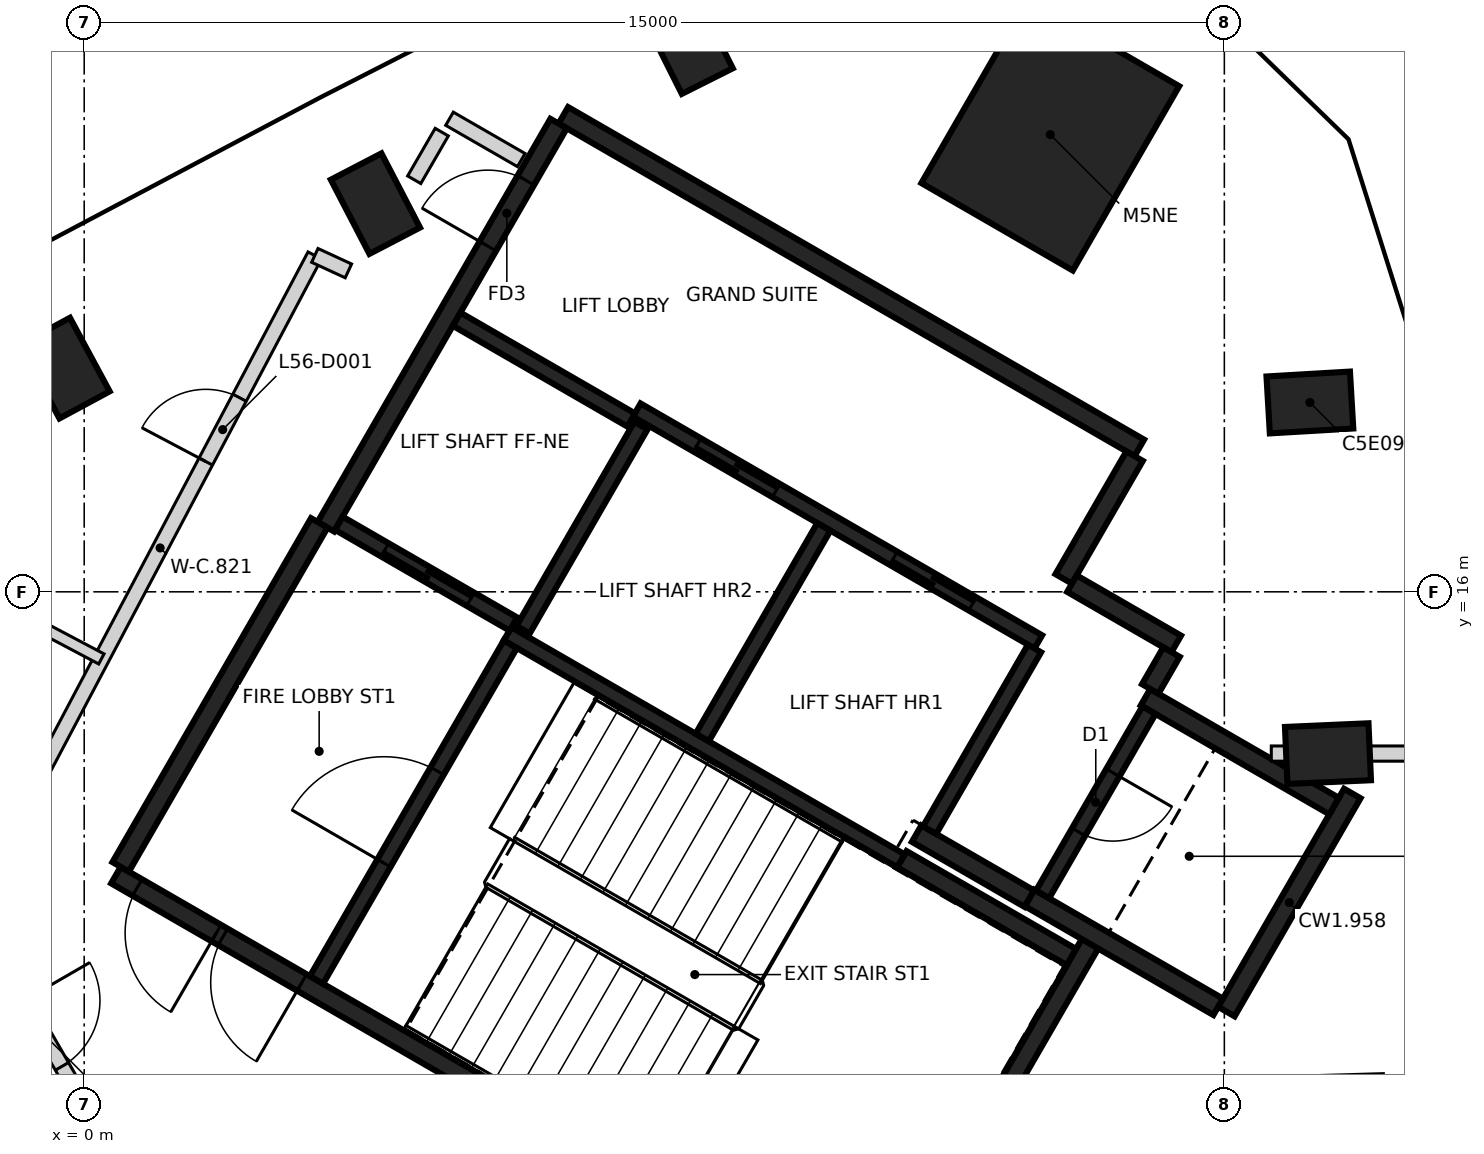
"""IFC4 building model, lengths in metres.
Left out: names, types, materials, properties, quantities, classifications, styles, units other than length and angle.
Written with IfcOpenShell. Run it as: python <this file> out.ifc"""

import sys

from ifc_helpers import new_model, si_unit, direction, frame, frame_2d, origin, origin_2d, place, context, subcontext, project, spatial, rectangle, extrude, element, fill, save


model = new_model("IFC4")
c1 = context("Model", 3, precision=1e-05, world=origin(), true_north=direction((0.0, 1.0)))
c2 = subcontext(c1, "Body", "Model", "MODEL_VIEW")
j1 = project(units=[si_unit("LENGTHUNIT", "METRE"), si_unit("PLANEANGLEUNIT", "RADIAN")], contexts=[c1])
p1 = place(None, origin())
s1 = spatial("IfcSite", under=j1, at=p1, CompositionType="ELEMENT")
p2 = place(p1, origin())
s2 = spatial("IfcBuilding", under=s1, at=p2, CompositionType="ELEMENT")
p3 = place(p2, frame((0.0, 0.0, 225.0)))
s3 = spatial("IfcBuildingStorey", under=s2, at=p3, CompositionType="ELEMENT", Elevation=225.0)
for number, where, z_axis, x_axis in (
    (1, (16.363, 13.872, -0.35), (0.0, 0.0, 1.0), (0.999, 0.044, 0.0)),
    (2, (16.125, 18.491, -0.35), (0.0, 0.0, 1.0), (0.998, 0.058, 0.0)),
    (3, (7.951, 23.211, -0.35), (0.0, 0.0, 1.0), (-0.449, 0.894, 0.0)),
    (4, (3.832, 21.107, -0.35), (0.0, 0.0, 1.0), (-0.461, 0.887, 0.0)),
    (5, (-0.256, 18.943, -0.35), (0.0, 0.0, 1.0), (-0.475, 0.88, 0.0)),
):
    element("IfcColumn", number, at=place(p3, frame(where, z_axis=z_axis, x_axis=x_axis)), inside=s3, PredefinedType="COLUMN", context=c2, shape_type="SweptSolid", body=[
        extrude(rectangle(XDim=1.1, YDim=0.75, at=origin_2d()), origin(), (0.0, 0.0, 1.0), 3.6),
    ])
p4 = place(p3, frame((12.71, 22.015, -0.35), z_axis=(0.0, 0.0, 1.0), x_axis=(0.5, 0.866025403784, 0.0)))
e6 = element("IfcColumn", 6, at=p4, inside=s3, PredefinedType="COLUMN", context=c2, shape_type="SweptSolid", body=[
    extrude(rectangle(XDim=2.8, YDim=2.3, at=origin_2d()), origin(), (0.0, 0.0, 1.0), 3.6),
])
p5 = place(p3, frame((10.42, 6.498, 0.0), z_axis=(0.0, 0.0, 1.0), x_axis=(-0.866021906294, 0.500006057782, 0.0)))
e7 = element("IfcWall", 7, at=p5, inside=s3, PredefinedType="SHEAR", context=c2, shape_type="SweptSolid", body=[
    extrude(rectangle(XDim=11.55, YDim=0.25, at=frame_2d((5.775, 0.0))), origin(), (0.0, 0.0, 1.0), 3.25),
])
p6 = place(p5, frame((10.025, 0.0, 0.0)))
e8 = element("IfcOpeningElement", 8, at=p6, cuts=e7, PredefinedType="OPENING", context=c2, shape_type="SweptSolid", body=[
    extrude(rectangle(XDim=1.2, YDim=2.1, at=frame_2d((0.6, 1.05))), frame((0.0, 0.135, 0.0), z_axis=(0.0, -1.0, 0.0), x_axis=(1.0, 0.0, 0.0)), (0.0, 0.0, 1.0), 0.27),
])
p7 = place(p5, frame((8.725, 0.0, 0.0)))
e9 = element("IfcOpeningElement", 9, at=p7, cuts=e7, PredefinedType="OPENING", context=c2, shape_type="SweptSolid", body=[
    extrude(rectangle(XDim=1.2, YDim=2.1, at=frame_2d((0.6, 1.05))), frame((0.0, 0.135, 0.0), z_axis=(0.0, -1.0, 0.0), x_axis=(1.0, 0.0, 0.0)), (0.0, 0.0, 1.0), 0.27),
])
p8 = place(p3, frame((6.304, 22.269, 0.0), z_axis=(0.0, 0.0, 1.0), x_axis=(0.866022959057, -0.500004234368, 0.0)))
e10 = element("IfcWall", 10, at=p8, inside=s3, PredefinedType="SHEAR", context=c2, shape_type="SweptSolid", body=[
    extrude(rectangle(XDim=8.75, YDim=0.25, at=frame_2d((4.375, 0.0))), origin(), (0.0, 0.0, 1.0), 3.25),
])
p9 = place(p3, frame((3.179, 16.856, 0.0), z_axis=(0.0, 0.0, 1.0), x_axis=(0.500001955336, 0.866024274868, 0.0)))
e11 = element("IfcWall", 11, at=p9, inside=s3, PredefinedType="SHEAR", context=c2, shape_type="SweptSolid", body=[
    extrude(rectangle(XDim=6.125, YDim=0.25, at=frame_2d((3.062, 0.0))), origin(), (0.0, 0.0, 1.0), 3.25),
])
p10 = place(p9, frame((4.263, 0.0, 0.0)))
e12 = element("IfcOpeningElement", 12, at=p10, cuts=e11, PredefinedType="OPENING", context=c2, shape_type="SweptSolid", body=[
    extrude(rectangle(XDim=1.0, YDim=2.1, at=frame_2d((0.5, 1.05))), frame((0.0, 0.135, 0.0), z_axis=(0.0, -1.0, 0.0), x_axis=(1.0, 0.0, 0.0)), (0.0, 0.0, 1.0), 0.27),
])
p11 = place(p3, frame((0.48, 12.381, 0.0), z_axis=(0.0, 0.0, 1.0), x_axis=(0.49999885962, 0.866026062182, 0.0)))
e13 = element("IfcWall", 13, at=p11, inside=s3, PredefinedType="SHEAR", context=c2, shape_type="SweptSolid", body=[
    extrude(rectangle(XDim=5.225, YDim=0.25, at=frame_2d((2.612, 0.0))), origin(), (0.0, 0.0, 1.0), 3.25),
])
p12 = place(p3, frame((13.238, 11.378, 0.0), z_axis=(0.0, 0.0, 1.0), x_axis=(-0.500008851346, -0.866020293397, 0.0)))
e14 = element("IfcWall", 14, at=p12, inside=s3, PredefinedType="SHEAR", context=c2, shape_type="SweptSolid", body=[
    extrude(rectangle(XDim=5.51, YDim=0.25, at=frame_2d((2.755, 0.0))), origin(), (0.0, 0.0, 1.0), 3.25),
])
p13 = place(p3, frame((16.684, 13.347, 0.0), z_axis=(0.0, 0.0, 1.0), x_axis=(-0.499998874531, -0.866026053573, 0.0)))
e15 = element("IfcWall", 15, at=p13, inside=s3, PredefinedType="SHEAR", context=c2, shape_type="SweptSolid", body=[
    extrude(rectangle(XDim=3.313, YDim=0.25, at=frame_2d((1.656, 0.0))), origin(), (0.0, 0.0, 1.0), 3.25),
])
p14 = place(p3, frame((14.918, 10.54, 0.0), z_axis=(0.0, 0.0, 1.0), x_axis=(-0.866063538972, 0.499933942099, 0.0)))
e16 = element("IfcWall", 16, at=p14, inside=s3, PredefinedType="SHEAR", context=c2, shape_type="SweptSolid", body=[
    extrude(rectangle(XDim=2.865, YDim=0.25, at=frame_2d((1.432, 0.0))), origin(), (0.0, 0.0, 1.0), 3.25),
])
p15 = place(p3, frame((13.963, 14.614, 0.0), z_axis=(0.0, 0.0, 1.0), x_axis=(0.866042235819, -0.499970844928, 0.0)))
e17 = element("IfcWall", 17, at=p15, inside=s3, PredefinedType="SHEAR", context=c2, shape_type="SweptSolid", body=[
    extrude(rectangle(XDim=2.865, YDim=0.25, at=frame_2d((1.432, 0.0))), origin(), (0.0, 0.0, 1.0), 3.25),
])
p16 = place(p3, frame((10.757, 12.481, 0.0), z_axis=(0.0, 0.0, 1.0), x_axis=(0.866022940537, -0.500004266446, 0.0)))
e18 = element("IfcWall", 18, at=p16, inside=s3, PredefinedType="SHEAR", context=c2, shape_type="SweptSolid", body=[
    extrude(rectangle(XDim=2.575, YDim=0.25, at=frame_2d((1.287, 0.0))), origin(), (0.0, 0.0, 1.0), 3.25),
])
p17 = place(p3, frame((13.819, 17.785, 0.0), z_axis=(0.0, 0.0, 1.0), x_axis=(-0.500039802285, -0.866002422705, 0.0)))
e19 = element("IfcWall", 19, at=p17, inside=s3, PredefinedType="SHEAR", context=c2, shape_type="SweptSolid", body=[
    extrude(rectangle(XDim=1.865, YDim=0.25, at=frame_2d((0.932, 0.0))), origin(), (0.0, 0.0, 1.0), 3.25),
])
p18 = place(p3, frame((12.433, 11.964, 0.0), z_axis=(0.0, 0.0, 1.0), x_axis=(-0.866038183914, 0.499977863513, 0.0)))
e20 = element("IfcWall", 20, at=p18, inside=s3, PredefinedType="SHEAR", context=c2, shape_type="SweptSolid", body=[
    extrude(rectangle(XDim=1.71, YDim=0.25, at=frame_2d((0.855, 0.0))), origin(), (0.0, 0.0, 1.0), 3.25),
])
p19 = place(p3, frame((12.995, 16.108, 0.0), z_axis=(0.0, 0.0, 1.0), x_axis=(0.866044474677, -0.49996696679, 0.0)))
e21 = element("IfcWall", 21, at=p19, inside=s3, PredefinedType="SHEAR", context=c2, shape_type="SweptSolid", body=[
    extrude(rectangle(XDim=1.584, YDim=0.25, at=frame_2d((0.792, 0.0))), origin(), (0.0, 0.0, 1.0), 3.25),
])
p20 = place(p3, frame((14.305, 15.207, 0.0), z_axis=(0.0, 0.0, 1.0), x_axis=(-0.499848422343, -0.866112899501, 0.0)))
e22 = element("IfcWall", 22, at=p20, inside=s3, PredefinedType="SHEAR", context=c2, shape_type="SweptSolid", body=[
    extrude(rectangle(XDim=0.559, YDim=0.25, at=frame_2d((0.28, 0.0))), origin(), (0.0, 0.0, 1.0), 3.25),
])
p21 = place(p3, frame((12.552, 15.342, 0.0), z_axis=(0.0, 0.0, 1.0), x_axis=(-0.866030299012, 0.499991521122, 0.0)))
e23 = element("IfcWall", 23, at=p21, inside=s3, PredefinedType="SHEAR", context=c2, shape_type="SweptSolid", body=[
    extrude(rectangle(XDim=6.1, YDim=0.2, at=frame_2d((3.05, 0.0))), origin(), (0.0, 0.0, 1.0), 3.25),
])
p22 = place(p21, frame((1.0, 0.0, 0.0)))
e24 = element("IfcOpeningElement", 24, at=p22, cuts=e23, PredefinedType="OPENING", context=c2, shape_type="SweptSolid", body=[
    extrude(rectangle(XDim=1.2, YDim=2.1, at=frame_2d((0.6, 1.05))), frame((0.0, 0.11, 0.0), z_axis=(0.0, -1.0, 0.0), x_axis=(1.0, 0.0, 0.0)), (0.0, 0.0, 1.0), 0.22),
])
p23 = place(p21, frame((3.982, 0.0, 0.0)))
e25 = element("IfcOpeningElement", 25, at=p23, cuts=e23, PredefinedType="OPENING", context=c2, shape_type="SweptSolid", body=[
    extrude(rectangle(XDim=1.2, YDim=2.1, at=frame_2d((0.6, 1.05))), frame((0.0, 0.11, 0.0), z_axis=(0.0, -1.0, 0.0), x_axis=(1.0, 0.0, 0.0)), (0.0, 0.0, 1.0), 0.22),
])
p24 = place(p3, frame((10.743, 12.46, 0.0), z_axis=(0.0, 0.0, 1.0), x_axis=(-0.866018848283, 0.500011354289, 0.0)))
e26 = element("IfcWall", 26, at=p24, inside=s3, PredefinedType="SHEAR", context=c2, shape_type="SweptSolid", body=[
    extrude(rectangle(XDim=5.974, YDim=0.2, at=frame_2d((2.987, 0.0))), origin(), (0.0, 0.0, 1.0), 3.25),
])
p25 = place(p3, frame((3.057, 10.895, 0.0), z_axis=(0.0, 0.0, 1.0), x_axis=(0.500027839223, 0.866009330205, 0.0)))
e27 = element("IfcWall", 27, at=p25, inside=s3, PredefinedType="SHEAR", context=c2, shape_type="SweptSolid", body=[
    extrude(rectangle(XDim=5.098, YDim=0.2, at=frame_2d((2.549, 0.0))), origin(), (0.0, 0.0, 1.0), 3.25),
])
p26 = place(p25, frame((1.774, 0.0, 0.0)))
e28 = element("IfcOpeningElement", 28, at=p26, cuts=e27, PredefinedType="OPENING", context=c2, shape_type="SweptSolid", body=[
    extrude(rectangle(XDim=1.4, YDim=2.1, at=frame_2d((0.7, 1.05))), frame((0.0, 0.11, 0.0), z_axis=(0.0, -1.0, 0.0), x_axis=(1.0, 0.0, 0.0)), (0.0, 0.0, 1.0), 0.22),
])
p27 = place(p3, frame((8.132, 14.084, 0.0), z_axis=(0.0, 0.0, 1.0), x_axis=(0.500030834389, 0.86600760081, 0.0)))
e29 = element("IfcWall", 29, at=p27, inside=s3, PredefinedType="SHEAR", context=c2, shape_type="SweptSolid", body=[
    extrude(rectangle(XDim=3.198, YDim=0.2, at=frame_2d((1.599, 0.0))), origin(), (0.0, 0.0, 1.0), 3.25),
])
p28 = place(p3, frame((14.008, 14.442, 0.0), z_axis=(0.0, 0.0, 1.0), x_axis=(-0.499986818241, -0.866033014143, 0.0)))
e30 = element("IfcWall", 30, at=p28, inside=s3, PredefinedType="SHEAR", context=c2, shape_type="SweptSolid", body=[
    extrude(rectangle(XDim=2.798, YDim=0.2, at=frame_2d((1.399, 0.0))), origin(), (0.0, 0.0, 1.0), 3.25),
])
p29 = place(p28, frame((0.949, 0.0, 0.0)))
e31 = element("IfcOpeningElement", 31, at=p29, cuts=e30, PredefinedType="OPENING", context=c2, shape_type="SweptSolid", body=[
    extrude(rectangle(XDim=0.9, YDim=2.1, at=frame_2d((0.45, 1.05))), frame((0.0, 0.11, 0.0), z_axis=(0.0, -1.0, 0.0), x_axis=(1.0, 0.0, 0.0)), (0.0, 0.0, 1.0), 0.22),
])
p30 = place(p3, frame((12.502, 15.255, 0.0), z_axis=(0.0, 0.0, 1.0), x_axis=(-0.499965018551, -0.866045599391, 0.0)))
e32 = element("IfcWall", 32, at=p30, inside=s3, PredefinedType="SHEAR", context=c2, shape_type="SweptSolid", body=[
    extrude(rectangle(XDim=2.759, YDim=0.2, at=frame_2d((1.379, 0.0))), origin(), (0.0, 0.0, 1.0), 3.25),
])
p31 = place(p3, frame((7.324, 18.187, 0.0), z_axis=(0.0, 0.0, 1.0), x_axis=(-0.499967891604, -0.866043940782, 0.0)))
e33 = element("IfcWall", 33, at=p31, inside=s3, PredefinedType="SHEAR", context=c2, shape_type="SweptSolid", body=[
    extrude(rectangle(XDim=3.1, YDim=0.2, at=frame_2d((1.55, 0.0))), origin(), (0.0, 0.0, 1.0), 3.25),
])
p32 = place(p3, frame((5.646, 15.576, 0.0), z_axis=(0.0, 0.0, 1.0), x_axis=(-0.866018407898, 0.500012117035, 0.0)))
e34 = element("IfcWall", 34, at=p32, inside=s3, PredefinedType="SHEAR", context=c2, shape_type="SweptSolid", body=[
    extrude(rectangle(XDim=2.651, YDim=0.2, at=frame_2d((1.325, 0.0))), origin(), (0.0, 0.0, 1.0), 3.25),
])
p33 = place(p32, frame((0.652, 0.0, 0.0)))
e35 = element("IfcOpeningElement", 35, at=p33, cuts=e34, PredefinedType="OPENING", context=c2, shape_type="SweptSolid", body=[
    extrude(rectangle(XDim=1.3, YDim=2.1, at=frame_2d((0.65, 1.05))), frame((0.0, 0.11, 0.0), z_axis=(0.0, -1.0, 0.0), x_axis=(1.0, 0.0, 0.0)), (0.0, 0.0, 1.0), 0.22),
])
p34 = place(p3, frame((7.196, 18.26, 0.0), z_axis=(0.0, 0.0, 1.0), x_axis=(-0.866018407898, 0.500012117035, 0.0)))
e36 = element("IfcWall", 36, at=p34, inside=s3, PredefinedType="SHEAR", context=c2, shape_type="SweptSolid", body=[
    extrude(rectangle(XDim=2.651, YDim=0.2, at=frame_2d((1.325, 0.0))), origin(), (0.0, 0.0, 1.0), 3.25),
])
p35 = place(p3, frame((-2.43, 13.459, 0.0), z_axis=(0.0, 0.0, 1.0), x_axis=(0.499957265187, -0.866050075334, 0.0)))
e37 = element("IfcWall", 37, at=p35, inside=s3, PredefinedType="PARTITIONING", context=c2, shape_type="SweptSolid", body=[
    extrude(rectangle(XDim=6.87, YDim=0.2, at=frame_2d((3.435, 0.0))), origin(), (0.0, 0.0, 1.0), 3.25),
])
p36 = place(p35, frame((3.275, 0.0, 0.0)))
e38 = element("IfcOpeningElement", 38, at=p36, cuts=e37, PredefinedType="OPENING", context=c2, shape_type="SweptSolid", body=[
    extrude(rectangle(XDim=1.0, YDim=2.1, at=frame_2d((0.5, 1.05))), frame((0.0, 0.11, 0.0), z_axis=(0.0, -1.0, 0.0), x_axis=(1.0, 0.0, 0.0)), (0.0, 0.0, 1.0), 0.22),
])
p37 = place(p3, frame((-1.035, 12.73, 0.0), z_axis=(0.0, 0.0, 1.0), x_axis=(0.46738248691, 0.884055208078, 0.0)))
e39 = element("IfcWall", 39, at=p37, inside=s3, PredefinedType="PARTITIONING", context=c2, shape_type="SweptSolid", body=[
    extrude(rectangle(XDim=8.705, YDim=0.2, at=frame_2d((4.352, 0.0))), origin(), (0.0, 0.0, 1.0), 3.25),
])
p38 = place(p37, frame((5.638, 0.0, 0.0)))
e40 = element("IfcOpeningElement", 40, at=p38, cuts=e39, PredefinedType="OPENING", context=c2, shape_type="SweptSolid", body=[
    extrude(rectangle(XDim=0.95, YDim=2.1, at=frame_2d((0.475, 1.05))), frame((0.0, 0.11, 0.0), z_axis=(0.0, -1.0, 0.0), x_axis=(1.0, 0.0, 0.0)), (0.0, 0.0, 1.0), 0.22),
])
p39 = place(p3, frame((3.034, 20.426, 0.0), z_axis=(0.0, 0.0, 1.0), x_axis=(0.907930035436, -0.41912176125, 0.0)))
e41 = element("IfcWall", 41, at=p39, inside=s3, PredefinedType="PARTITIONING", context=c2, shape_type="SweptSolid", body=[
    extrude(rectangle(XDim=0.487, YDim=0.2, at=frame_2d((0.244, 0.0))), origin(), (0.0, 0.0, 1.0), 3.25),
])
p40 = place(p3, frame((4.342, 21.421, 0.0), z_axis=(0.0, 0.0, 1.0), x_axis=(0.500238258503, 0.865887801468, 0.0)))
e42 = element("IfcWall", 42, at=p40, inside=s3, PredefinedType="PARTITIONING", context=c2, shape_type="SweptSolid", body=[
    extrude(rectangle(XDim=0.724, YDim=0.2, at=frame_2d((0.362, 0.0))), origin(), (0.0, 0.0, 1.0), 2.35),
])
p41 = place(p3, frame((4.806, 22.224, 0.0), z_axis=(0.0, 0.0, 1.0), x_axis=(0.866334698307, -0.499463903109, 0.0)))
e43 = element("IfcWall", 43, at=p41, inside=s3, PredefinedType="PARTITIONING", context=c2, shape_type="SweptSolid", body=[
    extrude(rectangle(XDim=1.09, YDim=0.2, at=frame_2d((0.545, 0.0))), origin(), (0.0, 0.0, 1.0), 2.35),
])
p42 = place(p3, frame((15.618, 13.872, 0.0), z_axis=(0.0, 0.0, 1.0), x_axis=(1.0, 0.0, 0.0)))
e44 = element("IfcWall", 44, at=p42, inside=s3, PredefinedType="PARTITIONING", context=c2, shape_type="SweptSolid", body=[
    extrude(rectangle(XDim=2.316, YDim=0.2, at=frame_2d((1.158, 0.0))), origin(), (0.0, 0.0, 1.0), 3.25),
])
p43 = place(p3, frame((-2.426, 16.519, 0.0), z_axis=(0.0, 0.0, 1.0), x_axis=(0.884056991815, -0.467379112952, 0.0)))
e45 = element("IfcWall", 45, at=p43, inside=s3, PredefinedType="PARTITIONING", context=c2, shape_type="SweptSolid", body=[
    extrude(rectangle(XDim=3.0, YDim=0.15, at=frame_2d((1.5, 0.0))), origin(), (0.0, 0.0, 1.0), 3.25),
])
p44 = place(p43, frame((1.1, 0.0, 0.0)))
e46 = element("IfcOpeningElement", 46, at=p44, cuts=e45, PredefinedType="OPENING", context=c2, shape_type="SweptSolid", body=[
    extrude(rectangle(XDim=0.8, YDim=2.1, at=frame_2d((0.4, 1.05))), frame((0.0, 0.085, 0.0), z_axis=(0.0, -1.0, 0.0), x_axis=(1.0, 0.0, 0.0)), (0.0, 0.0, 1.0), 0.17),
])
p45 = place(p3, frame((-2.131, 9.74, 0.0), z_axis=(0.0, 0.0, 1.0), x_axis=(0.500010275428, -0.866019471182, 0.0)))
e47 = element("IfcWall", 47, at=p45, inside=s3, PredefinedType="PARTITIONING", context=c2, shape_type="SweptSolid", body=[
    extrude(rectangle(XDim=3.5, YDim=0.15, at=frame_2d((1.75, 0.0))), origin(), (0.0, 0.0, 1.0), 3.25),
])
p46 = place(p45, frame((1.35, 0.0, 0.0)))
e48 = element("IfcOpeningElement", 48, at=p46, cuts=e47, PredefinedType="OPENING", context=c2, shape_type="SweptSolid", body=[
    extrude(rectangle(XDim=0.8, YDim=2.1, at=frame_2d((0.4, 1.05))), frame((0.0, 0.085, 0.0), z_axis=(0.0, -1.0, 0.0), x_axis=(1.0, 0.0, 0.0)), (0.0, 0.0, 1.0), 0.17),
])
p47 = place(p33, origin())
e49 = element("IfcDoor", 49, at=p47, inside=s3, OperationType="SLIDING_TO_RIGHT", PredefinedType="DOOR", context=c2, shape_type="SweptSolid", body=[
    extrude(rectangle(XDim=1.3, YDim=2.1, at=frame_2d((0.65, 1.05))), frame((0.0, 0.025, 0.0), z_axis=(0.0, -1.0, 0.0), x_axis=(1.0, 0.0, 0.0)), (0.0, 0.0, 1.0), 0.05),
])
fill(e35, e49)
p48 = place(p22, origin())
e50 = element("IfcDoor", 50, at=p48, inside=s3, OperationType="DOUBLE_DOOR_SLIDING", PredefinedType="DOOR", context=c2, shape_type="SweptSolid", body=[
    extrude(rectangle(XDim=1.2, YDim=2.1, at=frame_2d((0.6, 1.05))), frame((0.0, 0.025, 0.0), z_axis=(0.0, -1.0, 0.0), x_axis=(1.0, 0.0, 0.0)), (0.0, 0.0, 1.0), 0.05),
])
fill(e24, e50)
p49 = place(p23, origin())
e51 = element("IfcDoor", 51, at=p49, inside=s3, OperationType="DOUBLE_DOOR_SLIDING", PredefinedType="DOOR", context=c2, shape_type="SweptSolid", body=[
    extrude(rectangle(XDim=1.2, YDim=2.1, at=frame_2d((0.6, 1.05))), frame((0.0, 0.025, 0.0), z_axis=(0.0, -1.0, 0.0), x_axis=(1.0, 0.0, 0.0)), (0.0, 0.0, 1.0), 0.05),
])
fill(e25, e51)
p50 = place(p10, origin())
e52 = element("IfcDoor", 52, at=p50, inside=s3, OperationType="SINGLE_SWING_LEFT", PredefinedType="DOOR", context=c2, shape_type="SweptSolid", body=[
    extrude(rectangle(XDim=1.0, YDim=2.1, at=frame_2d((0.5, 1.05))), frame((0.0, 0.025, 0.0), z_axis=(0.0, -1.0, 0.0), x_axis=(1.0, 0.0, 0.0)), (0.0, 0.0, 1.0), 0.05),
])
fill(e12, e52)
p51 = place(p6, origin())
e53 = element("IfcDoor", 53, at=p51, inside=s3, OperationType="SINGLE_SWING_LEFT", PredefinedType="DOOR", context=c2, shape_type="SweptSolid", body=[
    extrude(rectangle(XDim=1.2, YDim=2.1, at=frame_2d((0.6, 1.05))), frame((0.0, 0.025, 0.0), z_axis=(0.0, -1.0, 0.0), x_axis=(1.0, 0.0, 0.0)), (0.0, 0.0, 1.0), 0.05),
])
fill(e8, e53)
p52 = place(p7, origin())
e54 = element("IfcDoor", 54, at=p52, inside=s3, OperationType="SINGLE_SWING_RIGHT", PredefinedType="DOOR", context=c2, shape_type="SweptSolid", body=[
    extrude(rectangle(XDim=1.2, YDim=2.1, at=frame_2d((0.6, 1.05))), frame((0.0, 0.025, 0.0), z_axis=(0.0, -1.0, 0.0), x_axis=(1.0, 0.0, 0.0)), (0.0, 0.0, 1.0), 0.05),
])
fill(e9, e54)
p53 = place(p26, origin())
e55 = element("IfcDoor", 55, at=p53, inside=s3, OperationType="SINGLE_SWING_RIGHT", PredefinedType="DOOR", context=c2, shape_type="SweptSolid", body=[
    extrude(rectangle(XDim=1.4, YDim=2.1, at=frame_2d((0.7, 1.05))), frame((0.0, 0.025, 0.0), z_axis=(0.0, -1.0, 0.0), x_axis=(1.0, 0.0, 0.0)), (0.0, 0.0, 1.0), 0.05),
])
fill(e28, e55)
p54 = place(p29, origin())
e56 = element("IfcDoor", 56, at=p54, inside=s3, OperationType="SINGLE_SWING_LEFT", PredefinedType="DOOR", context=c2, shape_type="SweptSolid", body=[
    extrude(rectangle(XDim=0.9, YDim=2.1, at=frame_2d((0.45, 1.05))), frame((0.0, 0.025, 0.0), z_axis=(0.0, -1.0, 0.0), x_axis=(1.0, 0.0, 0.0)), (0.0, 0.0, 1.0), 0.05),
])
fill(e31, e56)
p55 = place(p38, frame((0.95, 0.0, 0.0), z_axis=(0.0, 0.0, 1.0), x_axis=(-1.0, 0.0, 0.0)))
e57 = element("IfcDoor", 57, at=p55, inside=s3, OperationType="SINGLE_SWING_LEFT", PredefinedType="DOOR", context=c2, shape_type="SweptSolid", body=[
    extrude(rectangle(XDim=0.95, YDim=2.1, at=frame_2d((0.475, 1.05))), frame((0.0, 0.025, 0.0), z_axis=(0.0, -1.0, 0.0), x_axis=(1.0, 0.0, 0.0)), (0.0, 0.0, 1.0), 0.05),
])
fill(e40, e57)
p56 = place(p36, frame((1.0, 0.0, 0.0), z_axis=(0.0, 0.0, 1.0), x_axis=(-1.0, 0.0, 0.0)))
e58 = element("IfcDoor", 58, at=p56, inside=s3, OperationType="SINGLE_SWING_LEFT", PredefinedType="DOOR", context=c2, shape_type="SweptSolid", body=[
    extrude(rectangle(XDim=1.0, YDim=2.1, at=frame_2d((0.5, 1.05))), frame((0.0, 0.025, 0.0), z_axis=(0.0, -1.0, 0.0), x_axis=(1.0, 0.0, 0.0)), (0.0, 0.0, 1.0), 0.05),
])
fill(e38, e58)
save(model, sys.argv[1])
